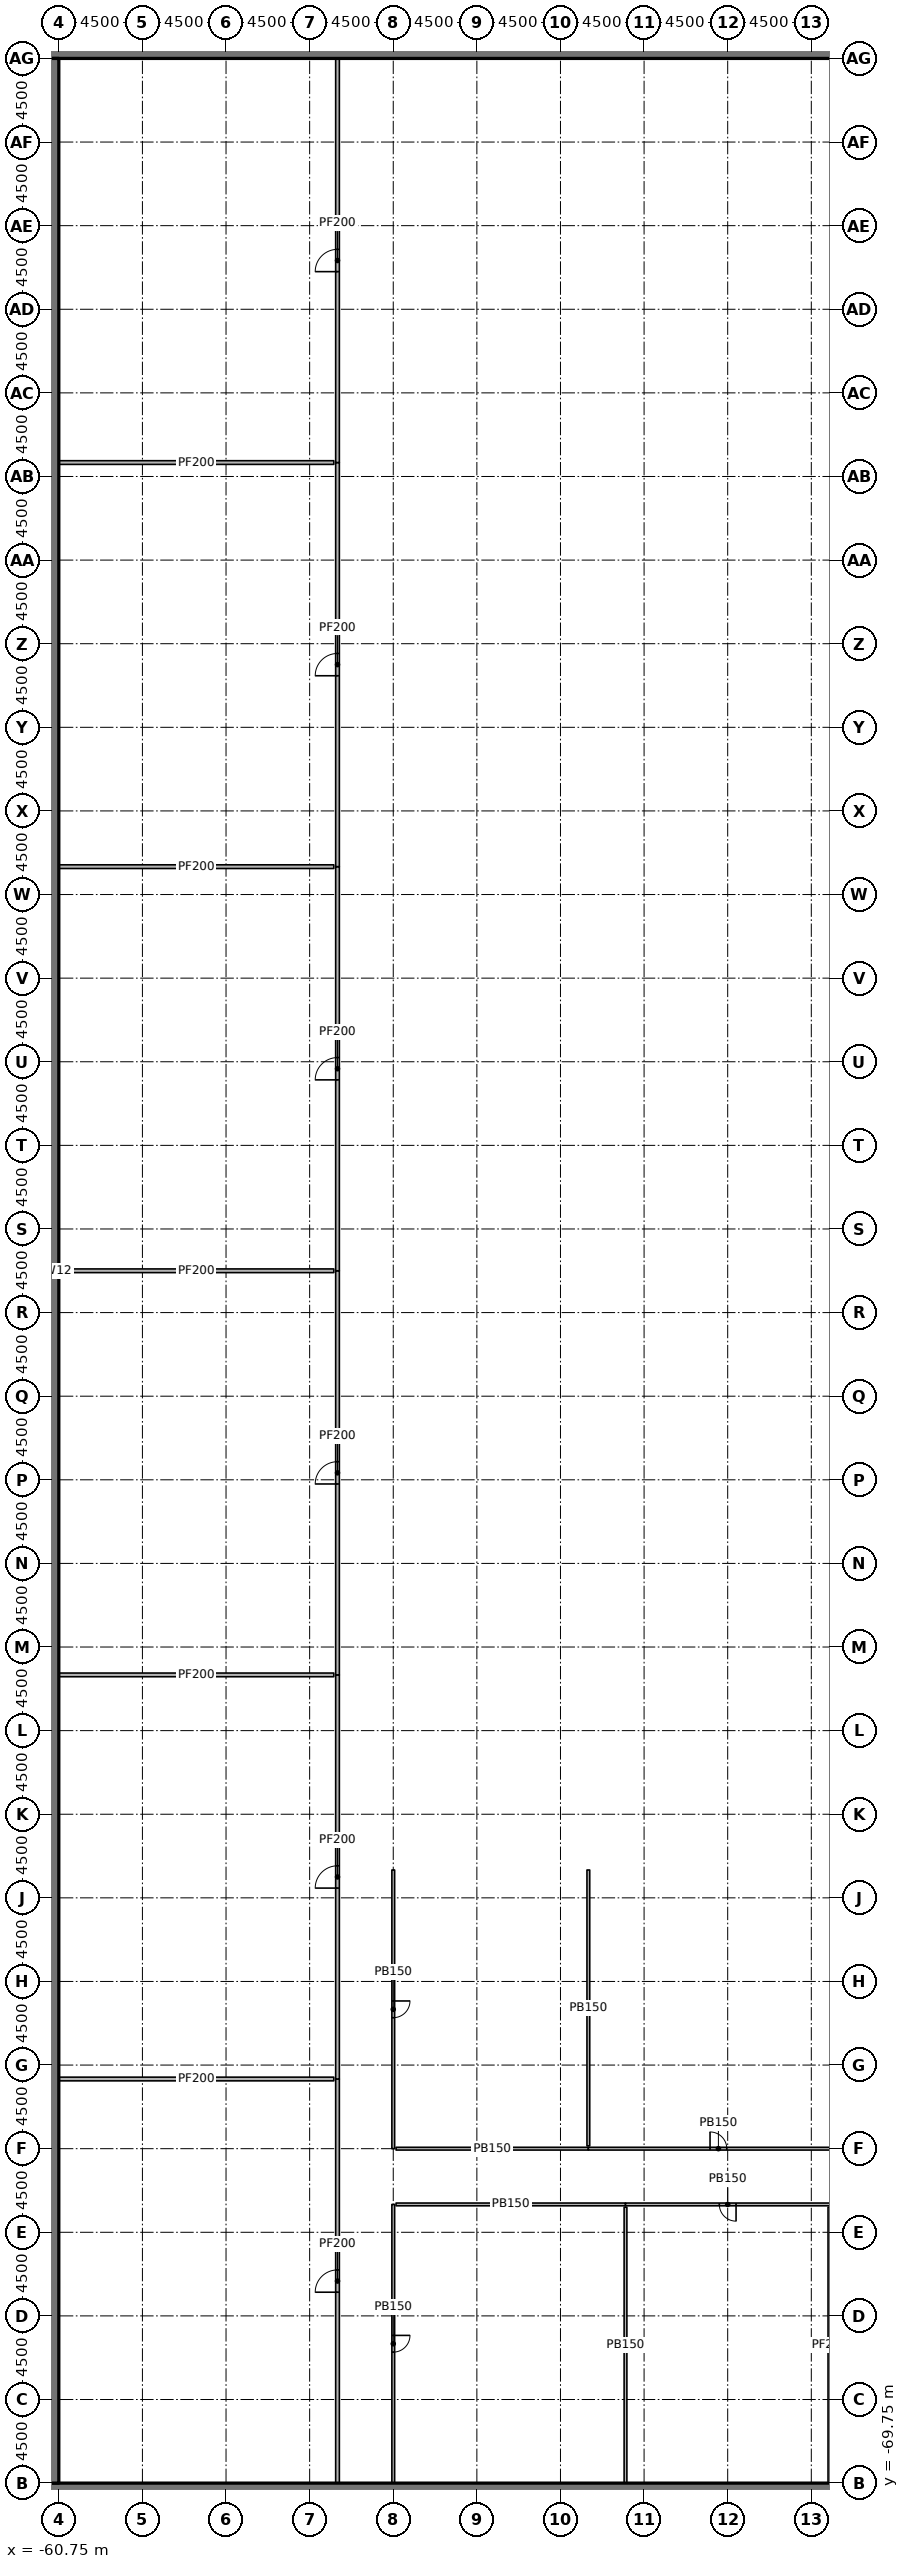
"""IFC4 building model, lengths in metres.
Left out: names, types, materials, properties, quantities, classifications, styles, units other than length and angle.
Written with IfcOpenShell. Run it as: python <this file> out.ifc"""

import sys

from ifc_helpers import new_model, si_unit, direction, frame, frame_2d, origin, origin_2d, place, context, subcontext, project, spatial, rectangle, extrude, element, fill, save


model = new_model("IFC4")
c1 = context("Model", 3, precision=1e-05, world=origin(), true_north=direction((0.0, 1.0)))
c2 = subcontext(c1, "Body", "Model", "MODEL_VIEW")
j1 = project(units=[si_unit("LENGTHUNIT", "METRE"), si_unit("PLANEANGLEUNIT", "RADIAN")], contexts=[c1])
p1 = place(None, origin())
s1 = spatial("IfcSite", under=j1, at=p1, CompositionType="ELEMENT")
p2 = place(p1, origin())
s2 = spatial("IfcBuilding", under=s1, at=p2, CompositionType="ELEMENT")
p3 = place(p2, frame((0.0, 0.0, -8.0)))
s3 = spatial("IfcBuildingStorey", under=s2, at=p3, CompositionType="ELEMENT", Elevation=-8.0)
for number, where, z_axis, x_axis in (
    (1, (-58.5, -61.5, 0.0), (0.0, 0.0, 1.0), (1.0, 0.0, 0.0)),
    (2, (-58.5, -43.5, 0.0), (0.0, 0.0, 1.0), (1.0, 0.0, 0.0)),
    (3, (-58.5, -25.5, 0.0), (0.0, 0.0, 1.0), (1.0, 0.0, 0.0)),
    (4, (-58.5, -7.5, 0.0), (0.0, 0.0, 1.0), (1.0, 0.0, 0.0)),
    (5, (-58.5, 10.5, 0.0), (0.0, 0.0, 1.0), (1.0, 0.0, 0.0)),
    (6, (-58.5, 28.5, 0.0), (0.0, 0.0, 1.0), (1.0, 0.0, 0.0)),
    (7, (-58.5, 46.5, 0.0), (0.0, 0.0, 1.0), (1.0, 0.0, 0.0)),
    (8, (-49.5, -61.5, 0.0), (0.0, 0.0, 1.0), (1.0, 0.0, 0.0)),
    (9, (-49.5, -43.5, 0.0), (0.0, 0.0, 1.0), (1.0, 0.0, 0.0)),
    (10, (-49.5, -25.5, 0.0), (0.0, 0.0, 1.0), (1.0, 0.0, 0.0)),
    (11, (-49.5, -7.5, 0.0), (0.0, 0.0, 1.0), (1.0, 0.0, 0.0)),
    (12, (-49.5, 10.5, 0.0), (0.0, 0.0, 1.0), (1.0, 0.0, 0.0)),
    (13, (-49.5, 28.5, 0.0), (0.0, 0.0, 1.0), (1.0, 0.0, 0.0)),
    (14, (-49.5, 46.5, 0.0), (0.0, 0.0, 1.0), (1.0, 0.0, 0.0)),
    (15, (-40.5, -61.5, 0.0), (0.0, 0.0, 1.0), (1.0, 0.0, 0.0)),
    (16, (-40.5, -43.5, 0.0), (0.0, 0.0, 1.0), (1.0, 0.0, 0.0)),
    (17, (-40.5, -25.5, 0.0), (0.0, 0.0, 1.0), (1.0, 0.0, 0.0)),
    (18, (-40.5, 10.5, 0.0), (0.0, 0.0, 1.0), (1.0, 0.0, 0.0)),
    (19, (-40.5, 28.5, 0.0), (0.0, 0.0, 1.0), (1.0, 0.0, 0.0)),
    (20, (-40.5, 46.5, 0.0), (0.0, 0.0, 1.0), (1.0, 0.0, 0.0)),
    (21, (-33.11, -2.25, 0.0), (0.0, 0.0, 1.0), (1.0, 0.0, 0.0)),
    (22, (-33.11, 2.25, 0.0), (0.0, 0.0, 1.0), (1.0, 0.0, 0.0)),
    (23, (-31.5, -61.5, 0.0), (0.0, 0.0, 1.0), (1.0, 0.0, 0.0)),
    (24, (-31.5, -43.5, 0.0), (0.0, 0.0, 1.0), (1.0, 0.0, 0.0)),
    (25, (-31.5, -25.5, 0.0), (0.0, 0.0, 1.0), (1.0, 0.0, 0.0)),
    (26, (-31.5, 28.5, 0.0), (0.0, 0.0, 1.0), (1.0, 0.0, 0.0)),
    (27, (-31.5, 46.5, 0.0), (0.0, 0.0, 1.0), (1.0, 0.0, 0.0)),
    (28, (-28.908, -5.475, 0.0), (0.0, 0.0, 1.0), (1.0, 0.0, 0.0)),
    (29, (-28.908, 5.475, 0.0), (0.0, 0.0, 1.0), (1.0, 0.0, 0.0)),
    (30, (-24.75, -6.25, 0.0), (0.0, 0.0, 1.0), (1.0, 0.0, 0.0)),
    (31, (-24.75, 6.25, 0.0), (0.0, 0.0, 1.0), (1.0, 0.0, 0.0)),
    (32, (-22.5, -61.5, 0.0), (0.0, 0.0, 1.0), (1.0, 0.0, 0.0)),
    (33, (-22.5, -43.5, 0.0), (0.0, 0.0, 1.0), (1.0, 0.0, 0.0)),
    (34, (-22.5, -25.5, 0.0), (0.0, 0.0, 1.0), (1.0, 0.0, 0.0)),
    (35, (-22.5, 28.5, 0.0), (0.0, 0.0, 1.0), (1.0, 0.0, 0.0)),
    (36, (-22.5, 46.5, 0.0), (0.0, 0.0, 1.0), (1.0, 0.0, 0.0)),
    (37, (-20.25, -6.11, 0.0), (0.0, 0.0, 1.0), (1.0, 0.0, 0.0)),
    (38, (-20.25, 6.11, 0.0), (0.0, 0.0, 1.0), (1.0, 0.0, 0.0)),
):
    element("IfcColumn", number, at=place(p3, frame(where, z_axis=z_axis, x_axis=x_axis)), inside=s3, PredefinedType="COLUMN", context=c2, shape_type="SweptSolid", body=[
        extrude(rectangle(XDim=1.2, YDim=1.2, at=origin_2d()), origin(), (0.0, 0.0, 1.0), 3.4),
    ])
for number, where, z_axis, x_axis in (
    (39, (-61.25, -70.0, 0.0), (0.0, 0.0, 1.0), (1.0, 0.0, 0.0)),
    (40, (-61.25, 61.0, 0.0), (0.0, 0.0, 1.0), (1.0, 0.0, 0.0)),
):
    element("IfcWall", number, at=place(p3, frame(where, z_axis=z_axis, x_axis=x_axis)), inside=s3, PredefinedType="SOLIDWALL", context=c2, shape_type="SweptSolid", body=[
        extrude(rectangle(XDim=122.5, YDim=0.5, at=frame_2d((61.25, 0.0))), origin(), (0.0, 0.0, 1.0), 4.0),
    ])
p4 = place(p3, frame((-61.0, -69.75, 0.0), z_axis=(0.0, 0.0, 1.0), x_axis=(0.0, 1.0, 0.0)))
e41 = element("IfcWall", 41, at=p4, inside=s3, PredefinedType="SOLIDWALL", context=c2, shape_type="SweptSolid", body=[
    extrude(rectangle(XDim=130.5, YDim=0.5, at=frame_2d((65.25, 0.0))), origin(), (0.0, 0.0, 1.0), 4.0),
])
p5 = place(p3, frame((-45.75, -69.75, 0.0), z_axis=(0.0, 0.0, 1.0), x_axis=(0.0, 1.0, 0.0)))
e42 = element("IfcWall", 42, at=p5, inside=s3, PredefinedType="PARTITIONING", context=c2, shape_type="SweptSolid", body=[
    extrude(rectangle(XDim=21.75, YDim=0.2, at=frame_2d((10.875, 0.0))), origin(), (0.0, 0.0, 1.0), 3.4),
])
p6 = place(p5, frame((10.275, 0.0, 0.0)))
e43 = element("IfcOpeningElement", 43, at=p6, cuts=e42, PredefinedType="OPENING", context=c2, shape_type="SweptSolid", body=[
    extrude(rectangle(XDim=1.2, YDim=2.1, at=frame_2d((0.6, 1.05))), frame((0.0, 0.11, 0.0), z_axis=(0.0, -1.0, 0.0), x_axis=(1.0, 0.0, 0.0)), (0.0, 0.0, 1.0), 0.22),
])
p7 = place(p3, frame((-45.75, -48.0, 0.0), z_axis=(0.0, 0.0, 1.0), x_axis=(0.0, 1.0, 0.0)))
e44 = element("IfcWall", 44, at=p7, inside=s3, PredefinedType="PARTITIONING", context=c2, shape_type="SweptSolid", body=[
    extrude(rectangle(XDim=21.75, YDim=0.2, at=frame_2d((10.875, 0.0))), origin(), (0.0, 0.0, 1.0), 3.4),
])
p8 = place(p7, frame((10.275, 0.0, 0.0)))
e45 = element("IfcOpeningElement", 45, at=p8, cuts=e44, PredefinedType="OPENING", context=c2, shape_type="SweptSolid", body=[
    extrude(rectangle(XDim=1.2, YDim=2.1, at=frame_2d((0.6, 1.05))), frame((0.0, 0.11, 0.0), z_axis=(0.0, -1.0, 0.0), x_axis=(1.0, 0.0, 0.0)), (0.0, 0.0, 1.0), 0.22),
])
p9 = place(p3, frame((-45.75, -26.25, 0.0), z_axis=(0.0, 0.0, 1.0), x_axis=(0.0, 1.0, 0.0)))
e46 = element("IfcWall", 46, at=p9, inside=s3, PredefinedType="PARTITIONING", context=c2, shape_type="SweptSolid", body=[
    extrude(rectangle(XDim=21.75, YDim=0.2, at=frame_2d((10.875, 0.0))), origin(), (0.0, 0.0, 1.0), 3.4),
])
p10 = place(p9, frame((10.275, 0.0, 0.0)))
e47 = element("IfcOpeningElement", 47, at=p10, cuts=e46, PredefinedType="OPENING", context=c2, shape_type="SweptSolid", body=[
    extrude(rectangle(XDim=1.2, YDim=2.1, at=frame_2d((0.6, 1.05))), frame((0.0, 0.11, 0.0), z_axis=(0.0, -1.0, 0.0), x_axis=(1.0, 0.0, 0.0)), (0.0, 0.0, 1.0), 0.22),
])
p11 = place(p3, frame((-45.75, -4.5, 0.0), z_axis=(0.0, 0.0, 1.0), x_axis=(0.0, 1.0, 0.0)))
e48 = element("IfcWall", 48, at=p11, inside=s3, PredefinedType="PARTITIONING", context=c2, shape_type="SweptSolid", body=[
    extrude(rectangle(XDim=21.75, YDim=0.2, at=frame_2d((10.875, 0.0))), origin(), (0.0, 0.0, 1.0), 3.4),
])
p12 = place(p11, frame((10.275, 0.0, 0.0)))
e49 = element("IfcOpeningElement", 49, at=p12, cuts=e48, PredefinedType="OPENING", context=c2, shape_type="SweptSolid", body=[
    extrude(rectangle(XDim=1.2, YDim=2.1, at=frame_2d((0.6, 1.05))), frame((0.0, 0.11, 0.0), z_axis=(0.0, -1.0, 0.0), x_axis=(1.0, 0.0, 0.0)), (0.0, 0.0, 1.0), 0.22),
])
p13 = place(p3, frame((-45.75, 17.25, 0.0), z_axis=(0.0, 0.0, 1.0), x_axis=(0.0, 1.0, 0.0)))
e50 = element("IfcWall", 50, at=p13, inside=s3, PredefinedType="PARTITIONING", context=c2, shape_type="SweptSolid", body=[
    extrude(rectangle(XDim=21.75, YDim=0.2, at=frame_2d((10.875, 0.0))), origin(), (0.0, 0.0, 1.0), 3.4),
])
p14 = place(p13, frame((10.275, 0.0, 0.0)))
e51 = element("IfcOpeningElement", 51, at=p14, cuts=e50, PredefinedType="OPENING", context=c2, shape_type="SweptSolid", body=[
    extrude(rectangle(XDim=1.2, YDim=2.1, at=frame_2d((0.6, 1.05))), frame((0.0, 0.11, 0.0), z_axis=(0.0, -1.0, 0.0), x_axis=(1.0, 0.0, 0.0)), (0.0, 0.0, 1.0), 0.22),
])
p15 = place(p3, frame((-45.75, 39.0, 0.0), z_axis=(0.0, 0.0, 1.0), x_axis=(0.0, 1.0, 0.0)))
e52 = element("IfcWall", 52, at=p15, inside=s3, PredefinedType="PARTITIONING", context=c2, shape_type="SweptSolid", body=[
    extrude(rectangle(XDim=21.75, YDim=0.2, at=frame_2d((10.875, 0.0))), origin(), (0.0, 0.0, 1.0), 3.4),
])
p16 = place(p15, frame((10.275, 0.0, 0.0)))
e53 = element("IfcOpeningElement", 53, at=p16, cuts=e52, PredefinedType="OPENING", context=c2, shape_type="SweptSolid", body=[
    extrude(rectangle(XDim=1.2, YDim=2.1, at=frame_2d((0.6, 1.05))), frame((0.0, 0.11, 0.0), z_axis=(0.0, -1.0, 0.0), x_axis=(1.0, 0.0, 0.0)), (0.0, 0.0, 1.0), 0.22),
])
p17 = place(p3, frame((-42.75, -54.75, 0.0), z_axis=(0.0, 0.0, 1.0), x_axis=(0.0, -1.0, 0.0)))
e54 = element("IfcWall", 54, at=p17, inside=s3, PredefinedType="PARTITIONING", context=c2, shape_type="SweptSolid", body=[
    extrude(rectangle(XDim=15.0, YDim=0.15, at=frame_2d((7.5, 0.0))), origin(), (0.0, 0.0, 1.0), 3.4),
])
p18 = place(p17, frame((7.05, 0.0, 0.0)))
e55 = element("IfcOpeningElement", 55, at=p18, cuts=e54, PredefinedType="OPENING", context=c2, shape_type="SweptSolid", body=[
    extrude(rectangle(XDim=0.9, YDim=2.1, at=frame_2d((0.45, 1.05))), frame((0.0, 0.085, 0.0), z_axis=(0.0, -1.0, 0.0), x_axis=(1.0, 0.0, 0.0)), (0.0, 0.0, 1.0), 0.17),
])
p19 = place(p3, frame((-42.75, -36.75, 0.0), z_axis=(0.0, 0.0, 1.0), x_axis=(0.0, -1.0, 0.0)))
e56 = element("IfcWall", 56, at=p19, inside=s3, PredefinedType="PARTITIONING", context=c2, shape_type="SweptSolid", body=[
    extrude(rectangle(XDim=15.0, YDim=0.15, at=frame_2d((7.5, 0.0))), origin(), (0.0, 0.0, 1.0), 3.4),
])
p20 = place(p19, frame((7.05, 0.0, 0.0)))
e57 = element("IfcOpeningElement", 57, at=p20, cuts=e56, PredefinedType="OPENING", context=c2, shape_type="SweptSolid", body=[
    extrude(rectangle(XDim=0.9, YDim=2.1, at=frame_2d((0.45, 1.05))), frame((0.0, 0.085, 0.0), z_axis=(0.0, -1.0, 0.0), x_axis=(1.0, 0.0, 0.0)), (0.0, 0.0, 1.0), 0.17),
])
for number, where, z_axis, x_axis in (
    (58, (-60.75, -48.0, 0.0), (0.0, 0.0, 1.0), (1.0, 0.0, 0.0)),
    (59, (-60.75, -26.25, 0.0), (0.0, 0.0, 1.0), (1.0, 0.0, 0.0)),
    (60, (-60.75, -4.5, 0.0), (0.0, 0.0, 1.0), (1.0, 0.0, 0.0)),
    (61, (-60.75, 17.25, 0.0), (0.0, 0.0, 1.0), (1.0, 0.0, 0.0)),
    (62, (-60.75, 39.0, 0.0), (0.0, 0.0, 1.0), (1.0, 0.0, 0.0)),
):
    element("IfcWall", number, at=place(p3, frame(where, z_axis=z_axis, x_axis=x_axis)), inside=s3, PredefinedType="PARTITIONING", context=c2, shape_type="SweptSolid", body=[
        extrude(rectangle(XDim=14.8, YDim=0.2, at=frame_2d((7.4, 0.0))), origin(), (0.0, 0.0, 1.0), 3.4),
    ])
p21 = place(p3, frame((-30.25, -54.75, 0.0), z_axis=(0.0, 0.0, 1.0), x_axis=(-1.0, 0.0, 0.0)))
e63 = element("IfcWall", 63, at=p21, inside=s3, PredefinedType="PARTITIONING", context=c2, shape_type="SweptSolid", body=[
    extrude(rectangle(XDim=12.35, YDim=0.15, at=frame_2d((6.175, 0.0))), origin(), (0.0, 0.0, 1.0), 3.4),
])
p22 = place(p3, frame((-19.25, -54.75, 0.0), z_axis=(0.0, 0.0, 1.0), x_axis=(-1.0, 0.0, 0.0)))
e64 = element("IfcWall", 64, at=p22, inside=s3, PredefinedType="PARTITIONING", context=c2, shape_type="SweptSolid", body=[
    extrude(rectangle(XDim=11.0, YDim=0.15, at=frame_2d((5.5, 0.0))), origin(), (0.0, 0.0, 1.0), 3.4),
])
p23 = place(p22, frame((5.05, 0.0, 0.0)))
e65 = element("IfcOpeningElement", 65, at=p23, cuts=e64, PredefinedType="OPENING", context=c2, shape_type="SweptSolid", body=[
    extrude(rectangle(XDim=0.9, YDim=2.1, at=frame_2d((0.45, 1.05))), frame((0.0, 0.085, 0.0), z_axis=(0.0, -1.0, 0.0), x_axis=(1.0, 0.0, 0.0)), (0.0, 0.0, 1.0), 0.17),
])
p24 = place(p3, frame((-42.6, -51.75, 0.0), z_axis=(0.0, 0.0, 1.0), x_axis=(1.0, 0.0, 0.0)))
e66 = element("IfcWall", 66, at=p24, inside=s3, PredefinedType="PARTITIONING", context=c2, shape_type="SweptSolid", body=[
    extrude(rectangle(XDim=10.35, YDim=0.15, at=frame_2d((5.175, 0.0))), origin(), (0.0, 0.0, 1.0), 3.4),
])
p25 = place(p3, frame((-32.25, -51.75, 0.0), z_axis=(0.0, 0.0, 1.0), x_axis=(1.0, 0.0, 0.0)))
e67 = element("IfcWall", 67, at=p25, inside=s3, PredefinedType="PARTITIONING", context=c2, shape_type="SweptSolid", body=[
    extrude(rectangle(XDim=14.0, YDim=0.15, at=frame_2d((7.0, 0.0))), origin(), (0.0, 0.0, 1.0), 3.4),
])
p26 = place(p25, frame((6.55, 0.0, 0.0)))
e68 = element("IfcOpeningElement", 68, at=p26, cuts=e67, PredefinedType="OPENING", context=c2, shape_type="SweptSolid", body=[
    extrude(rectangle(XDim=0.9, YDim=2.1, at=frame_2d((0.45, 1.05))), frame((0.0, 0.085, 0.0), z_axis=(0.0, -1.0, 0.0), x_axis=(1.0, 0.0, 0.0)), (0.0, 0.0, 1.0), 0.17),
])
p27 = place(p3, frame((-30.25, -54.9, 0.0), z_axis=(0.0, 0.0, 1.0), x_axis=(0.0, -1.0, 0.0)))
e69 = element("IfcWall", 69, at=p27, inside=s3, PredefinedType="PARTITIONING", context=c2, shape_type="SweptSolid", body=[
    extrude(rectangle(XDim=14.85, YDim=0.15, at=frame_2d((7.425, 0.0))), origin(), (0.0, 0.0, 1.0), 3.4),
])
p28 = place(p3, frame((-19.25, -54.9, 0.0), z_axis=(0.0, 0.0, 1.0), x_axis=(0.0, -1.0, 0.0)))
e70 = element("IfcWall", 70, at=p28, inside=s3, PredefinedType="PARTITIONING", context=c2, shape_type="SweptSolid", body=[
    extrude(rectangle(XDim=14.85, YDim=0.2, at=frame_2d((7.425, 0.0))), origin(), (0.0, 0.0, 1.0), 3.4),
])
p29 = place(p3, frame((-32.25, -36.75, 0.0), z_axis=(0.0, 0.0, 1.0), x_axis=(0.0, -1.0, 0.0)))
e71 = element("IfcWall", 71, at=p29, inside=s3, PredefinedType="PARTITIONING", context=c2, shape_type="SweptSolid", body=[
    extrude(rectangle(XDim=14.85, YDim=0.15, at=frame_2d((7.425, 0.0))), origin(), (0.0, 0.0, 1.0), 3.4),
])
p30 = place(p6, origin())
e72 = element("IfcDoor", 72, at=p30, inside=s3, OperationType="SINGLE_SWING_LEFT", PredefinedType="DOOR", context=c2, shape_type="SweptSolid", body=[
    extrude(rectangle(XDim=1.2, YDim=2.1, at=frame_2d((0.6, 1.05))), frame((0.0, 0.025, 0.0), z_axis=(0.0, -1.0, 0.0), x_axis=(1.0, 0.0, 0.0)), (0.0, 0.0, 1.0), 0.05),
])
fill(e43, e72)
p31 = place(p8, origin())
e73 = element("IfcDoor", 73, at=p31, inside=s3, OperationType="SINGLE_SWING_LEFT", PredefinedType="DOOR", context=c2, shape_type="SweptSolid", body=[
    extrude(rectangle(XDim=1.2, YDim=2.1, at=frame_2d((0.6, 1.05))), frame((0.0, 0.025, 0.0), z_axis=(0.0, -1.0, 0.0), x_axis=(1.0, 0.0, 0.0)), (0.0, 0.0, 1.0), 0.05),
])
fill(e45, e73)
p32 = place(p10, origin())
e74 = element("IfcDoor", 74, at=p32, inside=s3, OperationType="SINGLE_SWING_LEFT", PredefinedType="DOOR", context=c2, shape_type="SweptSolid", body=[
    extrude(rectangle(XDim=1.2, YDim=2.1, at=frame_2d((0.6, 1.05))), frame((0.0, 0.025, 0.0), z_axis=(0.0, -1.0, 0.0), x_axis=(1.0, 0.0, 0.0)), (0.0, 0.0, 1.0), 0.05),
])
fill(e47, e74)
p33 = place(p12, origin())
e75 = element("IfcDoor", 75, at=p33, inside=s3, OperationType="SINGLE_SWING_LEFT", PredefinedType="DOOR", context=c2, shape_type="SweptSolid", body=[
    extrude(rectangle(XDim=1.2, YDim=2.1, at=frame_2d((0.6, 1.05))), frame((0.0, 0.025, 0.0), z_axis=(0.0, -1.0, 0.0), x_axis=(1.0, 0.0, 0.0)), (0.0, 0.0, 1.0), 0.05),
])
fill(e49, e75)
p34 = place(p14, origin())
e76 = element("IfcDoor", 76, at=p34, inside=s3, OperationType="SINGLE_SWING_LEFT", PredefinedType="DOOR", context=c2, shape_type="SweptSolid", body=[
    extrude(rectangle(XDim=1.2, YDim=2.1, at=frame_2d((0.6, 1.05))), frame((0.0, 0.025, 0.0), z_axis=(0.0, -1.0, 0.0), x_axis=(1.0, 0.0, 0.0)), (0.0, 0.0, 1.0), 0.05),
])
fill(e51, e76)
p35 = place(p16, origin())
e77 = element("IfcDoor", 77, at=p35, inside=s3, OperationType="SINGLE_SWING_LEFT", PredefinedType="DOOR", context=c2, shape_type="SweptSolid", body=[
    extrude(rectangle(XDim=1.2, YDim=2.1, at=frame_2d((0.6, 1.05))), frame((0.0, 0.025, 0.0), z_axis=(0.0, -1.0, 0.0), x_axis=(1.0, 0.0, 0.0)), (0.0, 0.0, 1.0), 0.05),
])
fill(e53, e77)
p36 = place(p18, origin())
e78 = element("IfcDoor", 78, at=p36, inside=s3, OperationType="SINGLE_SWING_LEFT", PredefinedType="DOOR", context=c2, shape_type="SweptSolid", body=[
    extrude(rectangle(XDim=0.9, YDim=2.1, at=frame_2d((0.45, 1.05))), frame((0.0, 0.025, 0.0), z_axis=(0.0, -1.0, 0.0), x_axis=(1.0, 0.0, 0.0)), (0.0, 0.0, 1.0), 0.05),
])
fill(e55, e78)
p37 = place(p20, origin())
e79 = element("IfcDoor", 79, at=p37, inside=s3, OperationType="SINGLE_SWING_LEFT", PredefinedType="DOOR", context=c2, shape_type="SweptSolid", body=[
    extrude(rectangle(XDim=0.9, YDim=2.1, at=frame_2d((0.45, 1.05))), frame((0.0, 0.025, 0.0), z_axis=(0.0, -1.0, 0.0), x_axis=(1.0, 0.0, 0.0)), (0.0, 0.0, 1.0), 0.05),
])
fill(e57, e79)
p38 = place(p23, origin())
e80 = element("IfcDoor", 80, at=p38, inside=s3, OperationType="SINGLE_SWING_LEFT", PredefinedType="DOOR", context=c2, shape_type="SweptSolid", body=[
    extrude(rectangle(XDim=0.9, YDim=2.1, at=frame_2d((0.45, 1.05))), frame((0.0, 0.025, 0.0), z_axis=(0.0, -1.0, 0.0), x_axis=(1.0, 0.0, 0.0)), (0.0, 0.0, 1.0), 0.05),
])
fill(e65, e80)
p39 = place(p26, origin())
e81 = element("IfcDoor", 81, at=p39, inside=s3, OperationType="SINGLE_SWING_LEFT", PredefinedType="DOOR", context=c2, shape_type="SweptSolid", body=[
    extrude(rectangle(XDim=0.9, YDim=2.1, at=frame_2d((0.45, 1.05))), frame((0.0, 0.025, 0.0), z_axis=(0.0, -1.0, 0.0), x_axis=(1.0, 0.0, 0.0)), (0.0, 0.0, 1.0), 0.05),
])
fill(e68, e81)
save(model, sys.argv[1])
